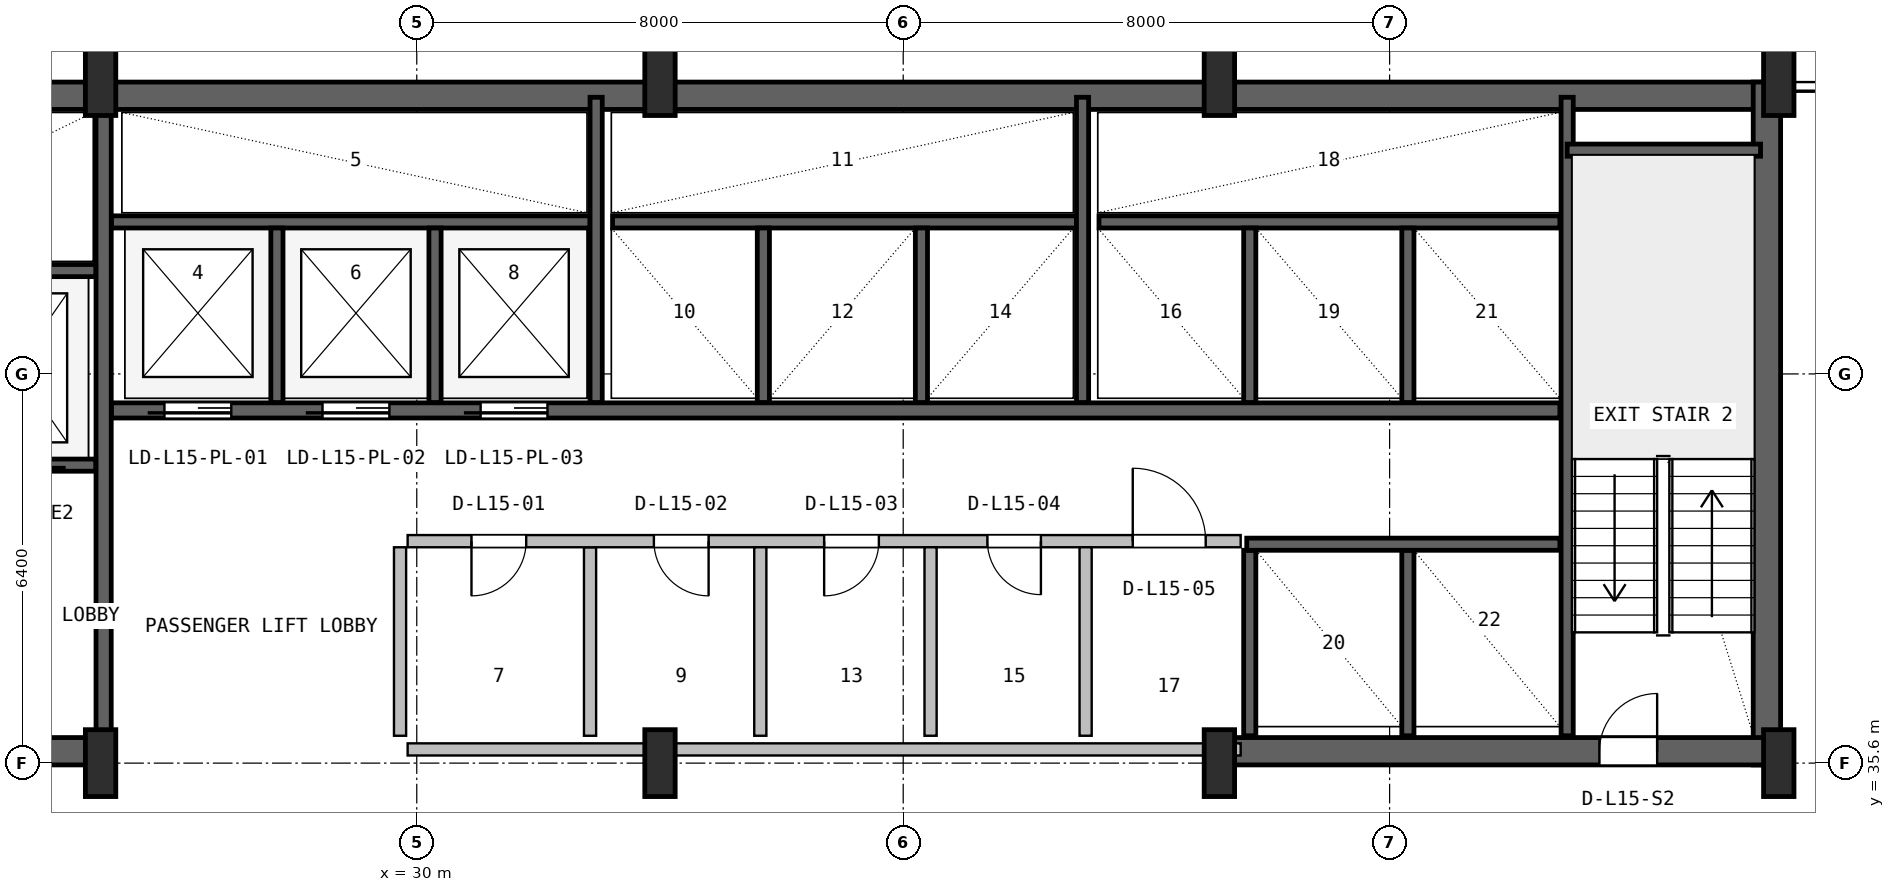
"""IFC4 building model, lengths in metres.
Left out: names, types, materials, properties, quantities, classifications, styles, units other than length and angle.
Written with IfcOpenShell. Run it as: python <this file> out.ifc"""

import sys

from ifc_helpers import new_model, si_unit, direction, frame, frame_2d, origin, origin_2d, place, context, subcontext, project, spatial, rectangle, i_section, extrude, source, transform, mapped, element, fill, save


model = new_model("IFC4")
c1 = context("Model", 3, precision=1e-05, world=origin(), true_north=direction((0.0, 1.0)))
c2 = subcontext(c1, "Body", "Model", "MODEL_VIEW")
j1 = project(units=[si_unit("LENGTHUNIT", "METRE"), si_unit("PLANEANGLEUNIT", "RADIAN")], contexts=[c1])
p1 = place(None, origin())
s1 = spatial("IfcSite", under=j1, at=p1, CompositionType="ELEMENT")
p2 = place(p1, origin())
s2 = spatial("IfcBuilding", under=s1, at=p2, CompositionType="ELEMENT")
p3 = place(p2, frame((0.0, 0.0, 66.6)))
s3 = spatial("IfcBuildingStorey", under=s2, at=p3, CompositionType="ELEMENT", Elevation=66.6)
p4 = place(p3, frame((15.6, 46.575, 0.0), z_axis=(0.0, 0.0, 1.0), x_axis=(1.0, 0.0, 0.0)))
e1 = element("IfcWall", 1, at=p4, inside=s3, PredefinedType="SHEAR", context=c2, shape_type="SweptSolid", body=[
    extrude(rectangle(XDim=36.8, YDim=0.45, at=frame_2d((18.4, 0.0))), origin(), (0.0, 0.0, 1.0), 3.65),
])
p5 = place(p3, frame((52.205, 35.57, 0.0), z_axis=(0.0, 0.0, 1.0), x_axis=(0.0, 1.0, 0.0)))
e2 = element("IfcWall", 2, at=p5, inside=s3, PredefinedType="SHEAR", context=c2, shape_type="SweptSolid", body=[
    extrude(rectangle(XDim=11.23, YDim=0.45, at=frame_2d((5.615, 0.0))), origin(), (0.0, 0.0, 1.0), 3.65),
])
p6 = place(p3, frame((15.57, 35.795, 0.0), z_axis=(0.0, 0.0, 1.0), x_axis=(1.0, 0.0, 0.0)))
e3 = element("IfcWall", 3, at=p6, inside=s3, PredefinedType="SHEAR", context=c2, shape_type="SweptSolid", body=[
    extrude(rectangle(XDim=9.23, YDim=0.45, at=frame_2d((4.615, 0.0))), origin(), (0.0, 0.0, 1.0), 3.65),
])
p7 = place(p6, frame((5.4, 0.0, 0.0)))
e4 = element("IfcOpeningElement", 4, at=p7, cuts=e3, PredefinedType="OPENING", context=c2, shape_type="SweptSolid", body=[
    extrude(rectangle(XDim=1.0, YDim=2.1, at=frame_2d((0.5, 1.05))), frame((0.0, 0.235, 0.0), z_axis=(0.0, -1.0, 0.0), x_axis=(1.0, 0.0, 0.0)), (0.0, 0.0, 1.0), 0.47),
])
p8 = place(p3, frame((43.2, 35.795, 0.0), z_axis=(0.0, 0.0, 1.0), x_axis=(1.0, 0.0, 0.0)))
e5 = element("IfcWall", 5, at=p8, inside=s3, PredefinedType="SHEAR", context=c2, shape_type="SweptSolid", body=[
    extrude(rectangle(XDim=9.23, YDim=0.45, at=frame_2d((4.615, 0.0))), origin(), (0.0, 0.0, 1.0), 3.65),
])
p9 = place(p8, frame((6.25, 0.0, 0.0)))
e6 = element("IfcOpeningElement", 6, at=p9, cuts=e5, PredefinedType="OPENING", context=c2, shape_type="SweptSolid", body=[
    extrude(rectangle(XDim=0.95, YDim=2.1, at=frame_2d((0.475, 1.05))), frame((0.0, 0.235, 0.0), z_axis=(0.0, -1.0, 0.0), x_axis=(1.0, 0.0, 0.0)), (0.0, 0.0, 1.0), 0.47),
])
m1 = source(origin(), c2, "Body", "SweptSolid", [
    extrude(i_section(OverallWidth=0.5, OverallDepth=1.1, WebThickness=0.018, FlangeThickness=0.032, FilletRadius=0.018, at=origin_2d()), origin(), (0.0, 0.0, 1.0), 3.9),
])
for number, where, z_axis, x_axis in (
    (7, (24.8, 35.6, 0.0), (0.0, 0.0, 1.0), (1.0, 0.0, 0.0)),
    (8, (24.8, 46.8, 0.0), (0.0, 0.0, 1.0), (1.0, 0.0, 0.0)),
    (9, (34.0, 35.6, 0.0), (0.0, 0.0, 1.0), (1.0, 0.0, 0.0)),
    (10, (34.0, 46.8, 0.0), (0.0, 0.0, 1.0), (1.0, 0.0, 0.0)),
    (11, (43.2, 35.6, 0.0), (0.0, 0.0, 1.0), (1.0, 0.0, 0.0)),
    (12, (43.2, 46.8, 0.0), (0.0, 0.0, 1.0), (1.0, 0.0, 0.0)),
    (13, (52.4, 35.6, 0.0), (0.0, 0.0, 1.0), (1.0, 0.0, 0.0)),
    (14, (52.4, 46.8, 0.0), (0.0, 0.0, 1.0), (1.0, 0.0, 0.0)),
):
    element("IfcColumn", number, at=place(p3, frame(where, z_axis=z_axis, x_axis=x_axis)), inside=s3, PredefinedType="COLUMN", context=c2, shape_type="MappedRepresentation", body=[
        mapped(m1, transform((0.0, 0.0, 0.0), x_axis=(1.0, 0.0, 0.0), y_axis=(0.0, 1.0, 0.0), z_axis=(0.0, 0.0, 1.0), scale=1.0)),
    ])
p10 = place(p3, frame((24.85, 36.05, 0.0), z_axis=(0.0, 0.0, 1.0), x_axis=(0.0, 1.0, 0.0)))
e15 = element("IfcWall", 15, at=p10, inside=s3, PredefinedType="SHEAR", context=c2, shape_type="SweptSolid", body=[
    extrude(rectangle(XDim=10.45, YDim=0.25, at=frame_2d((5.225, 0.0))), origin(), (0.0, 0.0, 1.0), 3.65),
])
p11 = place(p3, frame((19.2, 40.5, 0.0), z_axis=(0.0, 0.0, 1.0), x_axis=(1.0, 0.0, 0.0)))
e16 = element("IfcWall", 16, at=p11, inside=s3, PredefinedType="SHEAR", context=c2, shape_type="SweptSolid", body=[
    extrude(rectangle(XDim=5.52, YDim=0.2, at=frame_2d((2.76, 0.0))), origin(), (0.0, 0.0, 1.0), 3.65),
])
p12 = place(p11, frame((1.05, 0.0, 0.0)))
e17 = element("IfcOpeningElement", 17, at=p12, cuts=e16, PredefinedType="OPENING", context=c2, shape_type="SweptSolid", body=[
    extrude(rectangle(XDim=1.1, YDim=2.18, at=frame_2d((0.55, 1.09))), frame((0.0, 0.11, 0.0), z_axis=(0.0, -1.0, 0.0), x_axis=(1.0, 0.0, 0.0)), (0.0, 0.0, 1.0), 0.22),
])
p13 = place(p11, frame((3.65, 0.0, 0.0)))
e18 = element("IfcOpeningElement", 18, at=p13, cuts=e16, PredefinedType="OPENING", context=c2, shape_type="SweptSolid", body=[
    extrude(rectangle(XDim=1.1, YDim=2.18, at=frame_2d((0.55, 1.09))), frame((0.0, 0.11, 0.0), z_axis=(0.0, -1.0, 0.0), x_axis=(1.0, 0.0, 0.0)), (0.0, 0.0, 1.0), 0.22),
])
p14 = place(p3, frame((19.2, 43.7, 0.0), z_axis=(0.0, 0.0, 1.0), x_axis=(1.0, 0.0, 0.0)))
e19 = element("IfcWall", 19, at=p14, inside=s3, PredefinedType="SHEAR", context=c2, shape_type="SweptSolid", body=[
    extrude(rectangle(XDim=5.52, YDim=0.2, at=frame_2d((2.76, 0.0))), origin(), (0.0, 0.0, 1.0), 3.65),
])
p15 = place(p3, frame((48.92, 36.05, 0.0), z_axis=(0.0, 0.0, 1.0), x_axis=(0.0, 1.0, 0.0)))
e20 = element("IfcWall", 20, at=p15, inside=s3, PredefinedType="SHEAR", context=c2, shape_type="SweptSolid", body=[
    extrude(rectangle(XDim=10.5, YDim=0.2, at=frame_2d((5.25, 0.0))), origin(), (0.0, 0.0, 1.0), 3.65),
])
p16 = place(p3, frame((48.92, 45.68, 0.0), z_axis=(0.0, 0.0, 1.0), x_axis=(1.0, 0.0, 0.0)))
e21 = element("IfcWall", 21, at=p16, inside=s3, PredefinedType="SHEAR", context=c2, shape_type="SweptSolid", body=[
    extrude(rectangle(XDim=3.18, YDim=0.2, at=frame_2d((1.59, 0.0))), origin(), (0.0, 0.0, 1.0), 3.65),
])
p17 = place(p3, frame((24.98, 41.4, 0.0), z_axis=(0.0, 0.0, 1.0), x_axis=(1.0, 0.0, 0.0)))
e22 = element("IfcWall", 22, at=p17, inside=s3, PredefinedType="SHEAR", context=c2, shape_type="SweptSolid", body=[
    extrude(rectangle(XDim=23.82, YDim=0.25, at=frame_2d((11.91, 0.0))), origin(), (0.0, 0.0, 1.0), 3.65),
])
p18 = place(p17, frame((0.87, 0.0, 0.0)))
e23 = element("IfcOpeningElement", 23, at=p18, cuts=e22, PredefinedType="OPENING", context=c2, shape_type="SweptSolid", body=[
    extrude(rectangle(XDim=1.1, YDim=2.18, at=frame_2d((0.55, 1.09))), frame((0.0, 0.135, 0.0), z_axis=(0.0, -1.0, 0.0), x_axis=(1.0, 0.0, 0.0)), (0.0, 0.0, 1.0), 0.27),
])
p19 = place(p17, frame((3.47, 0.0, 0.0)))
e24 = element("IfcOpeningElement", 24, at=p19, cuts=e22, PredefinedType="OPENING", context=c2, shape_type="SweptSolid", body=[
    extrude(rectangle(XDim=1.1, YDim=2.18, at=frame_2d((0.55, 1.09))), frame((0.0, 0.135, 0.0), z_axis=(0.0, -1.0, 0.0), x_axis=(1.0, 0.0, 0.0)), (0.0, 0.0, 1.0), 0.27),
])
p20 = place(p17, frame((6.07, 0.0, 0.0)))
e25 = element("IfcOpeningElement", 25, at=p20, cuts=e22, PredefinedType="OPENING", context=c2, shape_type="SweptSolid", body=[
    extrude(rectangle(XDim=1.1, YDim=2.18, at=frame_2d((0.55, 1.09))), frame((0.0, 0.135, 0.0), z_axis=(0.0, -1.0, 0.0), x_axis=(1.0, 0.0, 0.0)), (0.0, 0.0, 1.0), 0.27),
])
p21 = place(p3, frame((24.98, 44.5, 0.0), z_axis=(0.0, 0.0, 1.0), x_axis=(1.0, 0.0, 0.0)))
e26 = element("IfcWall", 26, at=p21, inside=s3, PredefinedType="SHEAR", context=c2, shape_type="SweptSolid", body=[
    extrude(rectangle(XDim=7.87, YDim=0.2, at=frame_2d((3.935, 0.0))), origin(), (0.0, 0.0, 1.0), 3.65),
])
for number, where, z_axis, x_axis in (
    (27, (27.7, 41.53, 0.0), (0.0, 0.0, 1.0), (0.0, 1.0, 0.0)),
    (28, (30.3, 41.53, 0.0), (0.0, 0.0, 1.0), (0.0, 1.0, 0.0)),
):
    element("IfcWall", number, at=place(p3, frame(where, z_axis=z_axis, x_axis=x_axis)), inside=s3, PredefinedType="SHEAR", context=c2, shape_type="SweptSolid", body=[
        extrude(rectangle(XDim=2.87, YDim=0.2, at=frame_2d((1.435, 0.0))), origin(), (0.0, 0.0, 1.0), 3.65),
    ])
p22 = place(p3, frame((32.95, 41.53, 0.0), z_axis=(0.0, 0.0, 1.0), x_axis=(0.0, 1.0, 0.0)))
e29 = element("IfcWall", 29, at=p22, inside=s3, PredefinedType="SHEAR", context=c2, shape_type="SweptSolid", body=[
    extrude(rectangle(XDim=5.02, YDim=0.2, at=frame_2d((2.51, 0.0))), origin(), (0.0, 0.0, 1.0), 3.65),
])
p23 = place(p3, frame((33.22, 44.5, 0.0), z_axis=(0.0, 0.0, 1.0), x_axis=(1.0, 0.0, 0.0)))
e30 = element("IfcWall", 30, at=p23, inside=s3, PredefinedType="SHEAR", context=c2, shape_type="SweptSolid", body=[
    extrude(rectangle(XDim=7.63, YDim=0.2, at=frame_2d((3.815, 0.0))), origin(), (0.0, 0.0, 1.0), 3.65),
])
for number, where, z_axis, x_axis in (
    (31, (35.7, 41.53, 0.0), (0.0, 0.0, 1.0), (0.0, 1.0, 0.0)),
    (32, (38.3, 41.53, 0.0), (0.0, 0.0, 1.0), (0.0, 1.0, 0.0)),
):
    element("IfcWall", number, at=place(p3, frame(where, z_axis=z_axis, x_axis=x_axis)), inside=s3, PredefinedType="SHEAR", context=c2, shape_type="SweptSolid", body=[
        extrude(rectangle(XDim=2.87, YDim=0.2, at=frame_2d((1.435, 0.0))), origin(), (0.0, 0.0, 1.0), 3.65),
    ])
p24 = place(p3, frame((40.95, 41.53, 0.0), z_axis=(0.0, 0.0, 1.0), x_axis=(0.0, 1.0, 0.0)))
e33 = element("IfcWall", 33, at=p24, inside=s3, PredefinedType="SHEAR", context=c2, shape_type="SweptSolid", body=[
    extrude(rectangle(XDim=5.02, YDim=0.2, at=frame_2d((2.51, 0.0))), origin(), (0.0, 0.0, 1.0), 3.65),
])
p25 = place(p3, frame((41.22, 44.5, 0.0), z_axis=(0.0, 0.0, 1.0), x_axis=(1.0, 0.0, 0.0)))
e34 = element("IfcWall", 34, at=p25, inside=s3, PredefinedType="SHEAR", context=c2, shape_type="SweptSolid", body=[
    extrude(rectangle(XDim=7.58, YDim=0.2, at=frame_2d((3.79, 0.0))), origin(), (0.0, 0.0, 1.0), 3.65),
])
for number, where, z_axis, x_axis in (
    (35, (43.7, 41.53, 0.0), (0.0, 0.0, 1.0), (0.0, 1.0, 0.0)),
    (36, (46.3, 41.53, 0.0), (0.0, 0.0, 1.0), (0.0, 1.0, 0.0)),
):
    element("IfcWall", number, at=place(p3, frame(where, z_axis=z_axis, x_axis=x_axis)), inside=s3, PredefinedType="SHEAR", context=c2, shape_type="SweptSolid", body=[
        extrude(rectangle(XDim=2.87, YDim=0.2, at=frame_2d((1.435, 0.0))), origin(), (0.0, 0.0, 1.0), 3.65),
    ])
for number, where, z_axis, x_axis in (
    (37, (43.7, 36.05, 0.0), (0.0, 0.0, 1.0), (0.0, 1.0, 0.0)),
    (38, (46.3, 36.05, 0.0), (0.0, 0.0, 1.0), (0.0, 1.0, 0.0)),
):
    element("IfcWall", number, at=place(p3, frame(where, z_axis=z_axis, x_axis=x_axis)), inside=s3, PredefinedType="SHEAR", context=c2, shape_type="SweptSolid", body=[
        extrude(rectangle(XDim=3.05, YDim=0.2, at=frame_2d((1.525, 0.0))), origin(), (0.0, 0.0, 1.0), 3.65),
    ])
p26 = place(p3, frame((43.65, 39.2, 0.0), z_axis=(0.0, 0.0, 1.0), x_axis=(1.0, 0.0, 0.0)))
e39 = element("IfcWall", 39, at=p26, inside=s3, PredefinedType="SHEAR", context=c2, shape_type="SweptSolid", body=[
    extrude(rectangle(XDim=5.15, YDim=0.2, at=frame_2d((2.575, 0.0))), origin(), (0.0, 0.0, 1.0), 3.65),
])
p27 = place(p3, frame((29.85, 35.825, 0.0), z_axis=(0.0, 0.0, 1.0), x_axis=(1.0, 0.0, 0.0)))
e40 = element("IfcWall", 40, at=p27, inside=s3, PredefinedType="SOLIDWALL", context=c2, shape_type="SweptSolid", body=[
    extrude(rectangle(XDim=13.7, YDim=0.2, at=frame_2d((6.85, 0.0))), origin(), (0.0, 0.0, 1.0), 2.425),
])
p28 = place(p3, frame((32.85, 36.05, 0.0), z_axis=(0.0, 0.0, 1.0), x_axis=(0.0, 1.0, 0.0)))
e41 = element("IfcWall", 41, at=p28, inside=s3, PredefinedType="PLUMBINGWALL", context=c2, shape_type="SweptSolid", body=[
    extrude(rectangle(XDim=3.1, YDim=0.2, at=frame_2d((1.55, 0.0))), origin(), (0.0, 0.0, 1.0), 3.63),
])
p29 = place(p3, frame((29.85, 39.25, 0.0), z_axis=(0.0, 0.0, 1.0), x_axis=(1.0, 0.0, 0.0)))
e42 = element("IfcWall", 42, at=p29, inside=s3, PredefinedType="SOLIDWALL", context=c2, shape_type="SweptSolid", body=[
    extrude(rectangle(XDim=13.7, YDim=0.2, at=frame_2d((6.85, 0.0))), origin(), (0.0, 0.0, 1.0), 3.63),
])
p30 = place(p29, frame((1.05, 0.0, 0.0)))
e43 = element("IfcOpeningElement", 43, at=p30, cuts=e42, PredefinedType="OPENING", context=c2, shape_type="SweptSolid", body=[
    extrude(rectangle(XDim=0.9, YDim=2.06, at=frame_2d((0.45, 1.03))), frame((0.0, 0.11, 0.0), z_axis=(0.0, -1.0, 0.0), x_axis=(1.0, 0.0, 0.0)), (0.0, 0.0, 1.0), 0.22),
])
p31 = place(p29, frame((4.05, 0.0, 0.0)))
e44 = element("IfcOpeningElement", 44, at=p31, cuts=e42, PredefinedType="OPENING", context=c2, shape_type="SweptSolid", body=[
    extrude(rectangle(XDim=0.9, YDim=2.06, at=frame_2d((0.45, 1.03))), frame((0.0, 0.11, 0.0), z_axis=(0.0, -1.0, 0.0), x_axis=(1.0, 0.0, 0.0)), (0.0, 0.0, 1.0), 0.22),
])
p32 = place(p29, frame((6.85, 0.0, 0.0)))
e45 = element("IfcOpeningElement", 45, at=p32, cuts=e42, PredefinedType="OPENING", context=c2, shape_type="SweptSolid", body=[
    extrude(rectangle(XDim=0.9, YDim=2.06, at=frame_2d((0.45, 1.03))), frame((0.0, 0.11, 0.0), z_axis=(0.0, -1.0, 0.0), x_axis=(1.0, 0.0, 0.0)), (0.0, 0.0, 1.0), 0.22),
])
p33 = place(p29, frame((9.535, 0.0, 0.0)))
e46 = element("IfcOpeningElement", 46, at=p33, cuts=e42, PredefinedType="OPENING", context=c2, shape_type="SweptSolid", body=[
    extrude(rectangle(XDim=0.88, YDim=2.06, at=frame_2d((0.44, 1.03))), frame((0.0, 0.11, 0.0), z_axis=(0.0, -1.0, 0.0), x_axis=(1.0, 0.0, 0.0)), (0.0, 0.0, 1.0), 0.22),
])
p34 = place(p29, frame((11.925, 0.0, 0.0)))
e47 = element("IfcOpeningElement", 47, at=p34, cuts=e42, PredefinedType="OPENING", context=c2, shape_type="SweptSolid", body=[
    extrude(rectangle(XDim=1.2, YDim=2.1, at=frame_2d((0.6, 1.05))), frame((0.0, 0.11, 0.0), z_axis=(0.0, -1.0, 0.0), x_axis=(1.0, 0.0, 0.0)), (0.0, 0.0, 1.0), 0.22),
])
for number, where, z_axis, x_axis in (
    (48, (29.725, 36.05, 0.0), (0.0, 0.0, 1.0), (0.0, 1.0, 0.0)),
    (49, (35.65, 36.05, 0.0), (0.0, 0.0, 1.0), (0.0, 1.0, 0.0)),
    (50, (38.45, 36.05, 0.0), (0.0, 0.0, 1.0), (0.0, 1.0, 0.0)),
):
    element("IfcWall", number, at=place(p3, frame(where, z_axis=z_axis, x_axis=x_axis)), inside=s3, PredefinedType="PLUMBINGWALL", context=c2, shape_type="SweptSolid", body=[
        extrude(rectangle(XDim=3.1, YDim=0.2, at=frame_2d((1.55, 0.0))), origin(), (0.0, 0.0, 1.0), 3.63),
    ])
p35 = place(p3, frame((41.0, 36.05, 0.0), z_axis=(0.0, 0.0, 1.0), x_axis=(0.0, 1.0, 0.0)))
e51 = element("IfcWall", 51, at=p35, inside=s3, PredefinedType="SOLIDWALL", context=c2, shape_type="SweptSolid", body=[
    extrude(rectangle(XDim=3.1, YDim=0.2, at=frame_2d((1.55, 0.0))), origin(), (0.0, 0.0, 1.0), 3.63),
])
m2 = source(origin(), c2, "Body", "SweptSolid", [
    extrude(rectangle(XDim=0.95, YDim=2.1, at=frame_2d((0.475, 1.05))), frame((0.0, 0.025, 0.0), z_axis=(0.0, -1.0, 0.0), x_axis=(1.0, 0.0, 0.0)), (0.0, 0.0, 1.0), 0.05),
])
p36 = place(p9, origin())
e52 = element("IfcDoor", 52, at=p36, inside=s3, OperationType="SINGLE_SWING_RIGHT", PredefinedType="DOOR", context=c2, shape_type="MappedRepresentation", body=[
    mapped(m2, transform((0.0, 0.0, 0.0), x_axis=(1.0, 0.0, 0.0), y_axis=(0.0, 1.0, 0.0), z_axis=(0.0, 0.0, 1.0), scale=1.0)),
])
fill(e6, e52)
m3 = source(origin(), c2, "Body", "SweptSolid", [
    extrude(rectangle(XDim=1.1, YDim=2.18, at=frame_2d((0.55, 1.09))), frame((0.0, 0.025, 0.0), z_axis=(0.0, -1.0, 0.0), x_axis=(1.0, 0.0, 0.0)), (0.0, 0.0, 1.0), 0.05),
])
p37 = place(p18, frame((1.1, 0.0, 0.0), z_axis=(0.0, 0.0, 1.0), x_axis=(-1.0, 0.0, 0.0)))
e53 = element("IfcDoor", 53, at=p37, inside=s3, OperationType="SLIDING_TO_LEFT", PredefinedType="DOOR", context=c2, shape_type="MappedRepresentation", body=[
    mapped(m3, transform((0.0, 0.0, 0.0), x_axis=(1.0, 0.0, 0.0), y_axis=(0.0, 1.0, 0.0), z_axis=(0.0, 0.0, 1.0), scale=1.0)),
])
fill(e23, e53)
p38 = place(p19, frame((1.1, 0.0, 0.0), z_axis=(0.0, 0.0, 1.0), x_axis=(-1.0, 0.0, 0.0)))
e54 = element("IfcDoor", 54, at=p38, inside=s3, OperationType="SLIDING_TO_LEFT", PredefinedType="DOOR", context=c2, shape_type="MappedRepresentation", body=[
    mapped(m3, transform((0.0, 0.0, 0.0), x_axis=(1.0, 0.0, 0.0), y_axis=(0.0, 1.0, 0.0), z_axis=(0.0, 0.0, 1.0), scale=1.0)),
])
fill(e24, e54)
p39 = place(p20, frame((1.1, 0.0, 0.0), z_axis=(0.0, 0.0, 1.0), x_axis=(-1.0, 0.0, 0.0)))
e55 = element("IfcDoor", 55, at=p39, inside=s3, OperationType="SLIDING_TO_LEFT", PredefinedType="DOOR", context=c2, shape_type="MappedRepresentation", body=[
    mapped(m3, transform((0.0, 0.0, 0.0), x_axis=(1.0, 0.0, 0.0), y_axis=(0.0, 1.0, 0.0), z_axis=(0.0, 0.0, 1.0), scale=1.0)),
])
fill(e25, e55)
m4 = source(origin(), c2, "Body", "SweptSolid", [
    extrude(rectangle(XDim=0.9, YDim=2.06, at=frame_2d((0.45, 1.03))), frame((0.0, 0.025, 0.0), z_axis=(0.0, -1.0, 0.0), x_axis=(1.0, 0.0, 0.0)), (0.0, 0.0, 1.0), 0.05),
])
p40 = place(p30, frame((0.9, 0.0, 0.0), z_axis=(0.0, 0.0, 1.0), x_axis=(-1.0, 0.0, 0.0)))
e56 = element("IfcDoor", 56, at=p40, inside=s3, OperationType="SINGLE_SWING_LEFT", PredefinedType="DOOR", context=c2, shape_type="MappedRepresentation", body=[
    mapped(m4, transform((0.0, 0.0, 0.0), x_axis=(1.0, 0.0, 0.0), y_axis=(0.0, 1.0, 0.0), z_axis=(0.0, 0.0, 1.0), scale=1.0)),
])
fill(e43, e56)
p41 = place(p31, frame((0.9, 0.0, 0.0), z_axis=(0.0, 0.0, 1.0), x_axis=(-1.0, 0.0, 0.0)))
e57 = element("IfcDoor", 57, at=p41, inside=s3, OperationType="SINGLE_SWING_RIGHT", PredefinedType="DOOR", context=c2, shape_type="MappedRepresentation", body=[
    mapped(m4, transform((0.0, 0.0, 0.0), x_axis=(1.0, 0.0, 0.0), y_axis=(0.0, 1.0, 0.0), z_axis=(0.0, 0.0, 1.0), scale=1.0)),
])
fill(e44, e57)
p42 = place(p32, frame((0.9, 0.0, 0.0), z_axis=(0.0, 0.0, 1.0), x_axis=(-1.0, 0.0, 0.0)))
e58 = element("IfcDoor", 58, at=p42, inside=s3, OperationType="SINGLE_SWING_LEFT", PredefinedType="DOOR", context=c2, shape_type="MappedRepresentation", body=[
    mapped(m4, transform((0.0, 0.0, 0.0), x_axis=(1.0, 0.0, 0.0), y_axis=(0.0, 1.0, 0.0), z_axis=(0.0, 0.0, 1.0), scale=1.0)),
])
fill(e45, e58)
m5 = source(origin(), c2, "Body", "SweptSolid", [
    extrude(rectangle(XDim=0.88, YDim=2.06, at=frame_2d((0.44, 1.03))), frame((0.0, 0.025, 0.0), z_axis=(0.0, -1.0, 0.0), x_axis=(1.0, 0.0, 0.0)), (0.0, 0.0, 1.0), 0.05),
])
p43 = place(p33, frame((0.88, 0.0, 0.0), z_axis=(0.0, 0.0, 1.0), x_axis=(-1.0, 0.0, 0.0)))
e59 = element("IfcDoor", 59, at=p43, inside=s3, OperationType="SINGLE_SWING_RIGHT", PredefinedType="DOOR", context=c2, shape_type="MappedRepresentation", body=[
    mapped(m5, transform((0.0, 0.0, 0.0), x_axis=(1.0, 0.0, 0.0), y_axis=(0.0, 1.0, 0.0), z_axis=(0.0, 0.0, 1.0), scale=1.0)),
])
fill(e46, e59)
m6 = source(origin(), c2, "Body", "SweptSolid", [
    extrude(rectangle(XDim=1.2, YDim=2.1, at=frame_2d((0.6, 1.05))), frame((0.0, 0.025, 0.0), z_axis=(0.0, -1.0, 0.0), x_axis=(1.0, 0.0, 0.0)), (0.0, 0.0, 1.0), 0.05),
])
p44 = place(p34, origin())
e60 = element("IfcDoor", 60, at=p44, inside=s3, OperationType="SINGLE_SWING_LEFT", PredefinedType="DOOR", context=c2, shape_type="MappedRepresentation", body=[
    mapped(m6, transform((0.0, 0.0, 0.0), x_axis=(1.0, 0.0, 0.0), y_axis=(0.0, 1.0, 0.0), z_axis=(0.0, 0.0, 1.0), scale=1.0)),
])
fill(e47, e60)
save(model, sys.argv[1])
